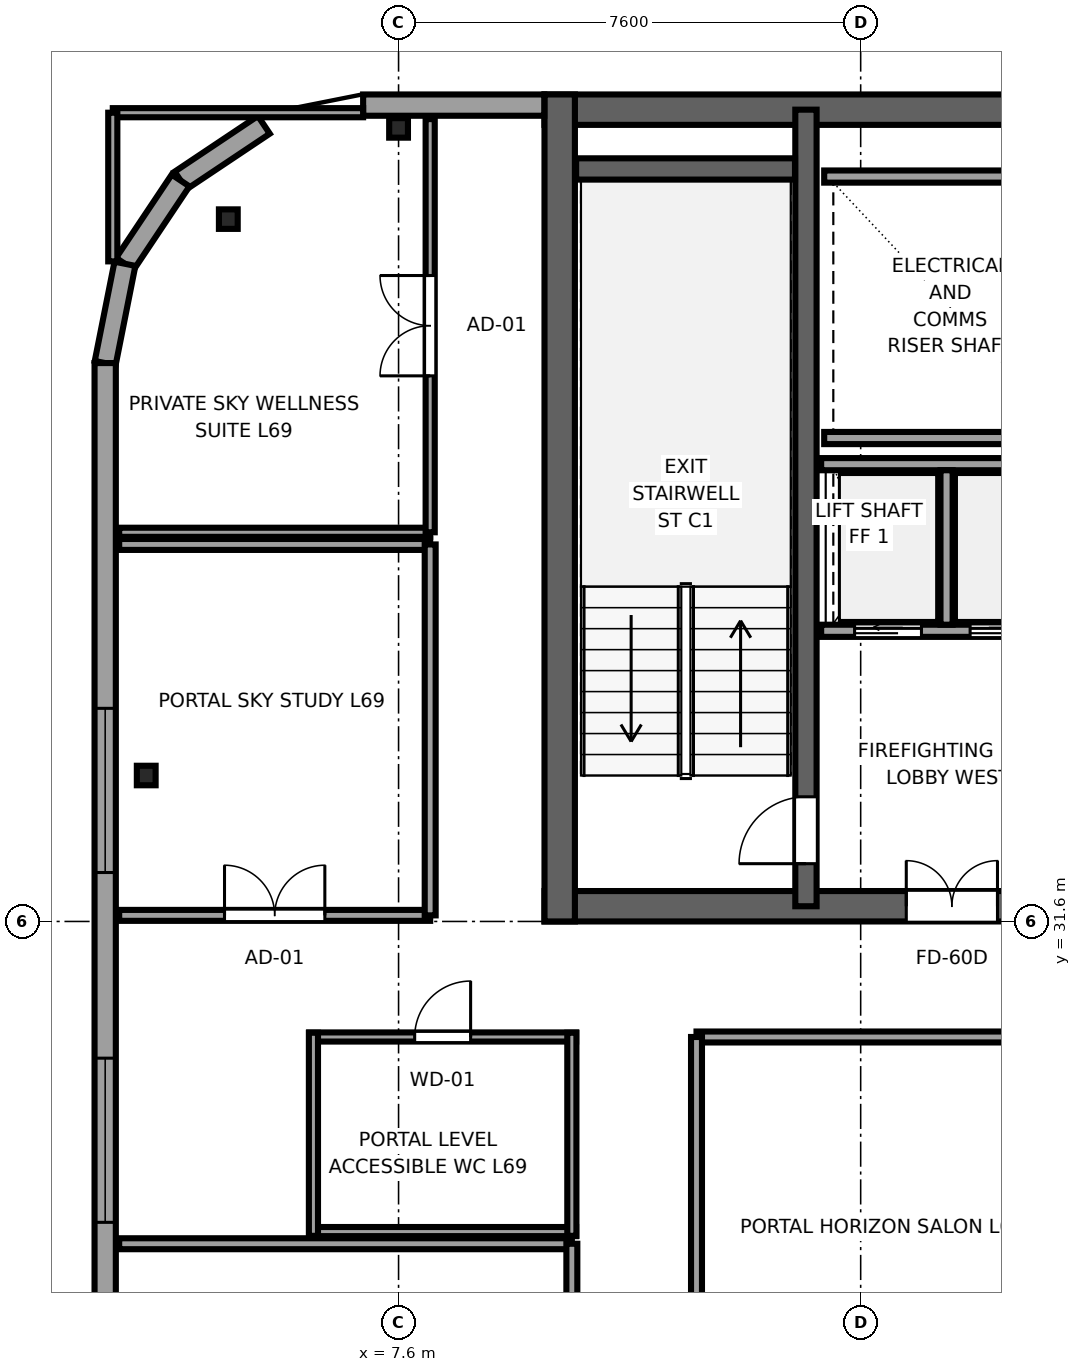
"""IFC4 building model, lengths in metres.
Left out: names, types, materials, properties, quantities, classifications, styles, units other than length and angle.
Written with IfcOpenShell. Run it as: python <this file> out.ifc"""

import sys

from ifc_helpers import new_model, si_unit, direction, frame, frame_2d, origin, origin_2d, place, context, subcontext, project, spatial, rectangle, i_section, extrude, source, transform, mapped, element, fill, save


model = new_model("IFC4")
c1 = context("Model", 3, precision=1e-05, world=origin(), true_north=direction((0.0, 1.0)))
c2 = subcontext(c1, "Body", "Model", "MODEL_VIEW")
j1 = project(units=[si_unit("LENGTHUNIT", "METRE"), si_unit("PLANEANGLEUNIT", "RADIAN")], contexts=[c1])
p1 = place(None, origin())
s1 = spatial("IfcSite", under=j1, at=p1, CompositionType="ELEMENT")
p2 = place(p1, origin())
s2 = spatial("IfcBuilding", under=s1, at=p2, CompositionType="ELEMENT")
p3 = place(p2, frame((0.0, 0.0, 259.4)))
s3 = spatial("IfcBuildingStorey", under=s2, at=p3, CompositionType="ELEMENT", Elevation=259.4)
p4 = place(p3, frame((10.0, 31.85, 0.0), z_axis=(0.0, 0.0, 1.0), x_axis=(1.0, 0.0, 0.0)))
e1 = element("IfcWall", 1, at=p4, inside=s3, PredefinedType="SHEAR", context=c2, shape_type="SweptSolid", body=[
    extrude(rectangle(XDim=26.0, YDim=0.5, at=frame_2d((13.0, 0.0))), origin(), (0.0, 0.0, 1.0), 3.55),
])
p5 = place(p4, frame((7.45, 0.0, 0.0), z_axis=(0.0, 0.0, 1.0), x_axis=(-1.0, 0.0, 0.0)))
e2 = element("IfcOpeningElement", 2, at=p5, cuts=e1, PredefinedType="OPENING", context=c2, shape_type="SweptSolid", body=[
    extrude(rectangle(XDim=1.5, YDim=2.04, at=frame_2d((0.75, 1.02))), frame((0.0, 0.26, 0.0), z_axis=(0.0, -1.0, 0.0), x_axis=(1.0, 0.0, 0.0)), (0.0, 0.0, 1.0), 0.52),
])
p6 = place(p4, frame((13.75, 0.0, 0.0), z_axis=(0.0, 0.0, 1.0), x_axis=(-1.0, 0.0, 0.0)))
e3 = element("IfcOpeningElement", 3, at=p6, cuts=e1, PredefinedType="OPENING", context=c2, shape_type="SweptSolid", body=[
    extrude(rectangle(XDim=1.5, YDim=2.04, at=frame_2d((0.75, 1.02))), frame((0.0, 0.26, 0.0), z_axis=(0.0, -1.0, 0.0), x_axis=(1.0, 0.0, 0.0)), (0.0, 0.0, 1.0), 0.52),
])
p7 = place(p4, frame((20.05, 0.0, 0.0), z_axis=(0.0, 0.0, 1.0), x_axis=(-1.0, 0.0, 0.0)))
e4 = element("IfcOpeningElement", 4, at=p7, cuts=e1, PredefinedType="OPENING", context=c2, shape_type="SweptSolid", body=[
    extrude(rectangle(XDim=1.5, YDim=2.04, at=frame_2d((0.75, 1.02))), frame((0.0, 0.26, 0.0), z_axis=(0.0, -1.0, 0.0), x_axis=(1.0, 0.0, 0.0)), (0.0, 0.0, 1.0), 0.52),
])
p8 = place(p3, frame((10.0, 44.95, 0.0), z_axis=(0.0, 0.0, 1.0), x_axis=(1.0, 0.0, 0.0)))
e5 = element("IfcWall", 5, at=p8, inside=s3, PredefinedType="SHEAR", context=c2, shape_type="SweptSolid", body=[
    extrude(rectangle(XDim=26.0, YDim=0.5, at=frame_2d((13.0, 0.0))), origin(), (0.0, 0.0, 1.0), 3.55),
])
p9 = place(p3, frame((10.25, 31.6, 0.0), z_axis=(0.0, 0.0, 1.0), x_axis=(0.0, 1.0, 0.0)))
e6 = element("IfcWall", 6, at=p9, inside=s3, PredefinedType="SHEAR", context=c2, shape_type="SweptSolid", body=[
    extrude(rectangle(XDim=13.6, YDim=0.5, at=frame_2d((6.8, 0.0))), origin(), (0.0, 0.0, 1.0), 3.55),
])
p10 = place(p3, frame((14.3, 31.85, 0.0), z_axis=(0.0, 0.0, 1.0), x_axis=(0.0, 1.0, 0.0)))
e7 = element("IfcWall", 7, at=p10, inside=s3, PredefinedType="SHEAR", context=c2, shape_type="SweptSolid", body=[
    extrude(rectangle(XDim=13.1, YDim=0.35, at=frame_2d((6.55, 0.0))), origin(), (0.0, 0.0, 1.0), 3.55),
])
p11 = place(p10, frame((0.7, 0.0, 0.0)))
e8 = element("IfcOpeningElement", 8, at=p11, cuts=e7, PredefinedType="OPENING", context=c2, shape_type="SweptSolid", body=[
    extrude(rectangle(XDim=1.1, YDim=2.12, at=frame_2d((0.55, 1.06))), frame((0.0, 0.185, 0.0), z_axis=(0.0, -1.0, 0.0), x_axis=(1.0, 0.0, 0.0)), (0.0, 0.0, 1.0), 0.37),
])
p12 = place(p3, frame((10.52, 43.975, 0.0), z_axis=(0.0, 0.0, 1.0), x_axis=(1.0, 0.0, 0.0)))
e9 = element("IfcWall", 9, at=p12, inside=s3, PredefinedType="SHEAR", context=c2, shape_type="SweptSolid", body=[
    extrude(rectangle(XDim=3.6, YDim=0.35, at=frame_2d((1.8, 0.0))), origin(), (0.0, 0.0, 1.0), 3.55),
])
m1 = source(origin(), c2, "Body", "SweptSolid", [
    extrude(i_section(OverallWidth=0.309, OverallDepth=0.321, WebThickness=0.014, FlangeThickness=0.022, FilletRadius=0.017, at=origin_2d()), origin(), (0.0, 0.0, 1.0), 3.55),
])
for number, where, z_axis, x_axis in (
    (10, (4.8, 43.15, 0.0), (0.0, 0.0, 1.0), (1.0, 0.0, 0.0)),
    (11, (7.6, 44.65, 0.0), (0.0, 0.0, 1.0), (1.0, 0.0, 0.0)),
    (12, (3.45, 34.0, 0.0), (0.0, 0.0, 1.0), (1.0, 0.0, 0.0)),
):
    element("IfcColumn", number, at=place(p3, frame(where, z_axis=z_axis, x_axis=x_axis)), inside=s3, PredefinedType="COLUMN", context=c2, shape_type="MappedRepresentation", body=[
        mapped(m1, transform((0.0, 0.0, 0.0), x_axis=(1.0, 0.0, 0.0), y_axis=(0.0, 1.0, 0.0), z_axis=(0.0, 0.0, 1.0), scale=1.0)),
    ])
p13 = place(p3, frame((9.996, 45.025, 0.0), z_axis=(0.0, 0.0, 1.0), x_axis=(-1.0, 0.0, 0.0)))
e13 = element("IfcWall", 13, at=p13, inside=s3, PredefinedType="SOLIDWALL", context=c2, shape_type="SweptSolid", body=[
    extrude(rectangle(XDim=2.979, YDim=0.35, at=frame_2d((1.49, 0.0))), origin(), (0.0, 0.0, 1.0), 2.16),
])
for number, where, z_axis, x_axis in (
    (14, (5.385, 44.7, 0.0), (0.0, 0.0, 1.0), (-0.832, -0.556, 0.0)),
    (15, (4.015, 43.785, 0.0), (0.0, 0.0, 1.0), (-0.556, -0.831, 0.0)),
):
    element("IfcWall", number, at=place(p3, frame(where, z_axis=z_axis, x_axis=x_axis)), inside=s3, PredefinedType="SOLIDWALL", context=c2, shape_type="SweptSolid", body=[
        extrude(rectangle(XDim=1.647, YDim=0.35, at=frame_2d((0.824, 0.0))), origin(), (0.0, 0.0, 1.0), 2.9),
    ])
p14 = place(p3, frame((3.1, 42.416, 0.0), z_axis=(0.0, 0.0, 1.0), x_axis=(-0.195044345786, -0.980794424524, 0.0)))
e16 = element("IfcWall", 16, at=p14, inside=s3, PredefinedType="SOLIDWALL", context=c2, shape_type="SweptSolid", body=[
    extrude(rectangle(XDim=1.665, YDim=0.35, at=frame_2d((0.833, 0.0))), origin(), (0.0, 0.0, 1.0), 3.37),
])
p15 = place(p3, frame((2.775, 40.783, 0.0), z_axis=(0.0, 0.0, 1.0), x_axis=(0.0, -1.0, 0.0)))
e17 = element("IfcWall", 17, at=p15, inside=s3, PredefinedType="SOLIDWALL", context=c2, shape_type="SweptSolid", body=[
    extrude(rectangle(XDim=33.766, YDim=0.35, at=frame_2d((16.883, 0.0))), origin(), (0.0, 0.0, 1.0), 3.37),
])
p16 = place(p15, frame((5.678, 0.0, 0.68)))
e18 = element("IfcOpeningElement", 18, at=p16, cuts=e17, PredefinedType="OPENING", context=c2, shape_type="SweptSolid", body=[
    extrude(rectangle(XDim=2.7, YDim=1.95, at=frame_2d((1.35, 0.975))), frame((0.0, 0.185, 0.0), z_axis=(0.0, -1.0, 0.0), x_axis=(1.0, 0.0, 0.0)), (0.0, 0.0, 1.0), 0.37),
])
p17 = place(p15, frame((11.431, 0.0, 0.68)))
e19 = element("IfcOpeningElement", 19, at=p17, cuts=e17, PredefinedType="OPENING", context=c2, shape_type="SweptSolid", body=[
    extrude(rectangle(XDim=2.7, YDim=1.95, at=frame_2d((1.35, 0.975))), frame((0.0, 0.185, 0.0), z_axis=(0.0, -1.0, 0.0), x_axis=(1.0, 0.0, 0.0)), (0.0, 0.0, 1.0), 0.37),
])
p18 = place(p15, frame((15.533, 0.0, 0.68)))
e20 = element("IfcOpeningElement", 20, at=p18, cuts=e17, PredefinedType="OPENING", context=c2, shape_type="SweptSolid", body=[
    extrude(rectangle(XDim=2.7, YDim=1.95, at=frame_2d((1.35, 0.975))), frame((0.0, 0.185, 0.0), z_axis=(0.0, -1.0, 0.0), x_axis=(1.0, 0.0, 0.0)), (0.0, 0.0, 1.0), 0.37),
])
p19 = place(p15, frame((20.185, 0.0, 0.68)))
e21 = element("IfcOpeningElement", 21, at=p19, cuts=e17, PredefinedType="OPENING", context=c2, shape_type="SweptSolid", body=[
    extrude(rectangle(XDim=2.7, YDim=1.95, at=frame_2d((1.35, 0.975))), frame((0.0, 0.185, 0.0), z_axis=(0.0, -1.0, 0.0), x_axis=(1.0, 0.0, 0.0)), (0.0, 0.0, 1.0), 0.37),
])
p20 = place(p15, frame((24.837, 0.0, 0.68)))
e22 = element("IfcOpeningElement", 22, at=p20, cuts=e17, PredefinedType="OPENING", context=c2, shape_type="SweptSolid", body=[
    extrude(rectangle(XDim=2.7, YDim=1.95, at=frame_2d((1.35, 0.975))), frame((0.0, 0.185, 0.0), z_axis=(0.0, -1.0, 0.0), x_axis=(1.0, 0.0, 0.0)), (0.0, 0.0, 1.0), 0.37),
])
p21 = place(p15, frame((29.489, 0.0, 0.68)))
e23 = element("IfcOpeningElement", 23, at=p21, cuts=e17, PredefinedType="OPENING", context=c2, shape_type="SweptSolid", body=[
    extrude(rectangle(XDim=2.7, YDim=1.95, at=frame_2d((1.35, 0.975))), frame((0.0, 0.185, 0.0), z_axis=(0.0, -1.0, 0.0), x_axis=(1.0, 0.0, 0.0)), (0.0, 0.0, 1.0), 0.37),
])
for number, where, z_axis, x_axis in (
    (24, (14.6, 39.55, 0.0), (0.0, 0.0, 1.0), (1.0, 0.0, 0.0)),
    (25, (14.6, 43.85, 0.0), (0.0, 0.0, 1.0), (1.0, 0.0, 0.0)),
):
    element("IfcWall", number, at=place(p3, frame(where, z_axis=z_axis, x_axis=x_axis)), inside=s3, PredefinedType="SOLIDWALL", context=c2, shape_type="SweptSolid", body=[
        extrude(rectangle(XDim=4.1, YDim=0.2, at=frame_2d((2.05, 0.0))), origin(), (0.0, 0.0, 1.0), 3.37),
    ])
p22 = place(p3, frame((14.55, 36.38, 0.0), z_axis=(0.0, 0.0, 1.0), x_axis=(1.0, 0.0, 0.0)))
e26 = element("IfcWall", 26, at=p22, inside=s3, PredefinedType="SOLIDWALL", context=c2, shape_type="SweptSolid", body=[
    extrude(rectangle(XDim=4.075, YDim=0.2, at=frame_2d((2.038, 0.0))), origin(), (0.0, 0.0, 1.0), 3.37),
])
p23 = place(p22, frame((0.55, 0.0, 0.0)))
e27 = element("IfcOpeningElement", 27, at=p23, cuts=e26, PredefinedType="OPENING", context=c2, shape_type="SweptSolid", body=[
    extrude(rectangle(XDim=1.1, YDim=2.12, at=frame_2d((0.55, 1.06))), frame((0.0, 0.11, 0.0), z_axis=(0.0, -1.0, 0.0), x_axis=(1.0, 0.0, 0.0)), (0.0, 0.0, 1.0), 0.22),
])
p24 = place(p22, frame((2.45, 0.0, 0.0)))
e28 = element("IfcOpeningElement", 28, at=p24, cuts=e26, PredefinedType="OPENING", context=c2, shape_type="SweptSolid", body=[
    extrude(rectangle(XDim=1.1, YDim=2.12, at=frame_2d((0.55, 1.06))), frame((0.0, 0.11, 0.0), z_axis=(0.0, -1.0, 0.0), x_axis=(1.0, 0.0, 0.0)), (0.0, 0.0, 1.0), 0.22),
])
p25 = place(p3, frame((14.55, 39.12, 0.0), z_axis=(0.0, 0.0, 1.0), x_axis=(1.0, 0.0, 0.0)))
e29 = element("IfcWall", 29, at=p25, inside=s3, PredefinedType="SOLIDWALL", context=c2, shape_type="SweptSolid", body=[
    extrude(rectangle(XDim=4.075, YDim=0.2, at=frame_2d((2.038, 0.0))), origin(), (0.0, 0.0, 1.0), 3.37),
])
p26 = place(p3, frame((16.613, 36.48, 0.0), z_axis=(0.0, 0.0, 1.0), x_axis=(0.0, 1.0, 0.0)))
e30 = element("IfcWall", 30, at=p26, inside=s3, PredefinedType="SOLIDWALL", context=c2, shape_type="SweptSolid", body=[
    extrude(rectangle(XDim=2.54, YDim=0.2, at=frame_2d((1.27, 0.0))), origin(), (0.0, 0.0, 1.0), 3.37),
])
p27 = place(p3, frame((12.5, 29.7, 0.0), z_axis=(0.0, 0.0, 1.0), x_axis=(1.0, 0.0, 0.0)))
e31 = element("IfcWall", 31, at=p27, inside=s3, PredefinedType="PARTITIONING", context=c2, shape_type="SweptSolid", body=[
    extrude(rectangle(XDim=6.1, YDim=0.18, at=frame_2d((3.05, 0.0))), origin(), (0.0, 0.0, 1.0), 3.37),
])
p28 = place(p3, frame((12.5, 22.5, 0.0), z_axis=(0.0, 0.0, 1.0), x_axis=(0.0, 1.0, 0.0)))
e32 = element("IfcWall", 32, at=p28, inside=s3, PredefinedType="PARTITIONING", context=c2, shape_type="SweptSolid", body=[
    extrude(rectangle(XDim=7.2, YDim=0.18, at=frame_2d((3.6, 0.0))), origin(), (0.0, 0.0, 1.0), 3.37),
])
p29 = place(p3, frame((3.005, 26.3, 0.0), z_axis=(0.0, 0.0, 1.0), x_axis=(1.0, 0.0, 0.0)))
e33 = element("IfcWall", 33, at=p29, inside=s3, PredefinedType="PARTITIONING", context=c2, shape_type="SweptSolid", body=[
    extrude(rectangle(XDim=7.445, YDim=0.18, at=frame_2d((3.723, 0.0))), origin(), (0.0, 0.0, 1.0), 3.37),
])
p30 = place(p3, frame((10.45, 22.0, 0.0), z_axis=(0.0, 0.0, 1.0), x_axis=(0.0, 1.0, 0.0)))
e34 = element("IfcWall", 34, at=p30, inside=s3, PredefinedType="PARTITIONING", context=c2, shape_type="SweptSolid", body=[
    extrude(rectangle(XDim=4.3, YDim=0.18, at=frame_2d((2.15, 0.0))), origin(), (0.0, 0.0, 1.0), 3.37),
])
p31 = place(p30, frame((1.325, 0.0, 0.0)))
e35 = element("IfcOpeningElement", 35, at=p31, cuts=e34, PredefinedType="OPENING", context=c2, shape_type="SweptSolid", body=[
    extrude(rectangle(XDim=1.65, YDim=2.15, at=frame_2d((0.825, 1.075))), frame((0.0, 0.1, 0.0), z_axis=(0.0, -1.0, 0.0), x_axis=(1.0, 0.0, 0.0)), (0.0, 0.0, 1.0), 0.2),
])
p32 = place(p3, frame((6.13, 26.5, 0.0), z_axis=(0.0, 0.0, 1.0), x_axis=(1.0, 0.0, 0.0)))
e36 = element("IfcWall", 36, at=p32, inside=s3, PredefinedType="PARTITIONING", context=c2, shape_type="SweptSolid", body=[
    extrude(rectangle(XDim=4.39, YDim=0.15, at=frame_2d((2.195, 0.0))), origin(), (0.0, 0.0, 1.0), 3.37),
])
p33 = place(p3, frame((6.13, 29.7, 0.0), z_axis=(0.0, 0.0, 1.0), x_axis=(1.0, 0.0, 0.0)))
e37 = element("IfcWall", 37, at=p33, inside=s3, PredefinedType="PARTITIONING", context=c2, shape_type="SweptSolid", body=[
    extrude(rectangle(XDim=4.39, YDim=0.15, at=frame_2d((2.195, 0.0))), origin(), (0.0, 0.0, 1.0), 3.37),
])
p34 = place(p33, frame((1.735, 0.0, 0.0)))
e38 = element("IfcOpeningElement", 38, at=p34, cuts=e37, PredefinedType="OPENING", context=c2, shape_type="SweptSolid", body=[
    extrude(rectangle(XDim=0.92, YDim=2.01, at=frame_2d((0.46, 1.005))), frame((0.0, 0.085, 0.0), z_axis=(0.0, -1.0, 0.0), x_axis=(1.0, 0.0, 0.0)), (0.0, 0.0, 1.0), 0.17),
])
for number, where, z_axis, x_axis in (
    (39, (6.2, 26.43, 0.0), (0.0, 0.0, 1.0), (0.0, 1.0, 0.0)),
    (40, (10.45, 26.43, 0.0), (0.0, 0.0, 1.0), (0.0, 1.0, 0.0)),
):
    element("IfcWall", number, at=place(p3, frame(where, z_axis=z_axis, x_axis=x_axis)), inside=s3, PredefinedType="PARTITIONING", context=c2, shape_type="SweptSolid", body=[
        extrude(rectangle(XDim=3.34, YDim=0.15, at=frame_2d((1.67, 0.0))), origin(), (0.0, 0.0, 1.0), 3.37),
    ])
p35 = place(p3, frame((3.005, 31.7, 0.0), z_axis=(0.0, 0.0, 1.0), x_axis=(1.0, 0.0, 0.0)))
e41 = element("IfcWall", 41, at=p35, inside=s3, PredefinedType="PARTITIONING", context=c2, shape_type="SweptSolid", body=[
    extrude(rectangle(XDim=5.115, YDim=0.18, at=frame_2d((2.558, 0.0))), origin(), (0.0, 0.0, 1.0), 3.37),
])
p36 = place(p35, frame((1.732, 0.0, 0.0)))
e42 = element("IfcOpeningElement", 42, at=p36, cuts=e41, PredefinedType="OPENING", context=c2, shape_type="SweptSolid", body=[
    extrude(rectangle(XDim=1.65, YDim=2.15, at=frame_2d((0.825, 1.075))), frame((0.0, 0.1, 0.0), z_axis=(0.0, -1.0, 0.0), x_axis=(1.0, 0.0, 0.0)), (0.0, 0.0, 1.0), 0.2),
])
p37 = place(p3, frame((3.005, 37.8, 0.0), z_axis=(0.0, 0.0, 1.0), x_axis=(1.0, 0.0, 0.0)))
e43 = element("IfcWall", 43, at=p37, inside=s3, PredefinedType="PARTITIONING", context=c2, shape_type="SweptSolid", body=[
    extrude(rectangle(XDim=5.115, YDim=0.18, at=frame_2d((2.558, 0.0))), origin(), (0.0, 0.0, 1.0), 3.37),
])
p38 = place(p3, frame((8.12, 31.7, 0.0), z_axis=(0.0, 0.0, 1.0), x_axis=(0.0, 1.0, 0.0)))
e44 = element("IfcWall", 44, at=p38, inside=s3, PredefinedType="PARTITIONING", context=c2, shape_type="SweptSolid", body=[
    extrude(rectangle(XDim=6.1, YDim=0.18, at=frame_2d((3.05, 0.0))), origin(), (0.0, 0.0, 1.0), 3.37),
])
p39 = place(p3, frame((3.005, 38.0, 0.0), z_axis=(0.0, 0.0, 1.0), x_axis=(1.0, 0.0, 0.0)))
e45 = element("IfcWall", 45, at=p39, inside=s3, PredefinedType="PARTITIONING", context=c2, shape_type="SweptSolid", body=[
    extrude(rectangle(XDim=5.115, YDim=0.15, at=frame_2d((2.558, 0.0))), origin(), (0.0, 0.0, 1.0), 3.37),
])
p40 = place(p3, frame((2.9, 44.9, 0.0), z_axis=(0.0, 0.0, 1.0), x_axis=(1.0, 0.0, 0.0)))
e46 = element("IfcWall", 46, at=p40, inside=s3, PredefinedType="PARTITIONING", context=c2, shape_type="SweptSolid", body=[
    extrude(rectangle(XDim=4.117, YDim=0.15, at=frame_2d((2.059, 0.0))), origin(), (0.0, 0.0, 1.0), 3.37),
])
p41 = place(p3, frame((2.9, 42.455, 0.0), z_axis=(0.0, 0.0, 1.0), x_axis=(0.0, 1.0, 0.0)))
e47 = element("IfcWall", 47, at=p41, inside=s3, PredefinedType="PARTITIONING", context=c2, shape_type="SweptSolid", body=[
    extrude(rectangle(XDim=2.445, YDim=0.15, at=frame_2d((1.222, 0.0))), origin(), (0.0, 0.0, 1.0), 3.37),
])
p42 = place(p3, frame((8.12, 38.0, 0.0), z_axis=(0.0, 0.0, 1.0), x_axis=(0.0, 1.0, 0.0)))
e48 = element("IfcWall", 48, at=p42, inside=s3, PredefinedType="PARTITIONING", context=c2, shape_type="SweptSolid", body=[
    extrude(rectangle(XDim=6.795, YDim=0.15, at=frame_2d((3.397, 0.0))), origin(), (0.0, 0.0, 1.0), 3.37),
])
p43 = place(p42, frame((2.573, 0.0, 0.0)))
e49 = element("IfcOpeningElement", 49, at=p43, cuts=e48, PredefinedType="OPENING", context=c2, shape_type="SweptSolid", body=[
    extrude(rectangle(XDim=1.65, YDim=2.15, at=frame_2d((0.825, 1.075))), frame((0.0, 0.085, 0.0), z_axis=(0.0, -1.0, 0.0), x_axis=(1.0, 0.0, 0.0)), (0.0, 0.0, 1.0), 0.17),
])
m2 = source(origin(), c2, "Body", "SweptSolid", [
    extrude(rectangle(XDim=2.7, YDim=1.95, at=frame_2d((1.35, 0.975))), frame((0.0, 0.09, 0.0), z_axis=(0.0, -1.0, 0.0), x_axis=(1.0, 0.0, 0.0)), (0.0, 0.0, 1.0), 0.06),
])
p44 = place(p16, origin())
e50 = element("IfcWindow", 50, at=p44, inside=s3, PartitioningType="TRIPLE_PANEL_HORIZONTAL", PredefinedType="WINDOW", context=c2, shape_type="MappedRepresentation", body=[
    mapped(m2, transform((0.0, 0.0, 0.0), x_axis=(1.0, 0.0, 0.0), y_axis=(0.0, 1.0, 0.0), z_axis=(0.0, 0.0, 1.0), scale=1.0)),
])
fill(e18, e50)
p45 = place(p17, origin())
e51 = element("IfcWindow", 51, at=p45, inside=s3, PartitioningType="TRIPLE_PANEL_HORIZONTAL", PredefinedType="WINDOW", context=c2, shape_type="MappedRepresentation", body=[
    mapped(m2, transform((0.0, 0.0, 0.0), x_axis=(1.0, 0.0, 0.0), y_axis=(0.0, 1.0, 0.0), z_axis=(0.0, 0.0, 1.0), scale=1.0)),
])
fill(e19, e51)
m3 = source(origin(), c2, "Body", "SweptSolid", [
    extrude(rectangle(XDim=1.1, YDim=2.12, at=frame_2d((0.55, 1.06))), frame((0.0, 0.025, 0.0), z_axis=(0.0, -1.0, 0.0), x_axis=(1.0, 0.0, 0.0)), (0.0, 0.0, 1.0), 0.05),
])
p46 = place(p11, origin())
e52 = element("IfcDoor", 52, at=p46, inside=s3, OperationType="SINGLE_SWING_LEFT", PredefinedType="DOOR", context=c2, shape_type="MappedRepresentation", body=[
    mapped(m3, transform((0.0, 0.0, 0.0), x_axis=(1.0, 0.0, 0.0), y_axis=(0.0, 1.0, 0.0), z_axis=(0.0, 0.0, 1.0), scale=1.0)),
])
fill(e8, e52)
m4 = source(origin(), c2, "Body", "SweptSolid", [
    extrude(rectangle(XDim=1.5, YDim=2.04, at=frame_2d((0.75, 1.02))), frame((0.0, 0.025, 0.0), z_axis=(0.0, -1.0, 0.0), x_axis=(1.0, 0.0, 0.0)), (0.0, 0.0, 1.0), 0.05),
])
p47 = place(p5, origin())
e53 = element("IfcDoor", 53, at=p47, inside=s3, OperationType="DOUBLE_DOOR_SINGLE_SWING", PredefinedType="DOOR", context=c2, shape_type="MappedRepresentation", body=[
    mapped(m4, transform((0.0, 0.0, 0.0), x_axis=(1.0, 0.0, 0.0), y_axis=(0.0, 1.0, 0.0), z_axis=(0.0, 0.0, 1.0), scale=1.0)),
])
fill(e2, e53)
m5 = source(origin(), c2, "Body", "SweptSolid", [
    extrude(rectangle(XDim=1.1, YDim=2.12, at=frame_2d((0.55, 1.06))), frame((0.0, 0.025, 0.0), z_axis=(0.0, -1.0, 0.0), x_axis=(1.0, 0.0, 0.0)), (0.0, 0.0, 1.0), 0.05),
])
p48 = place(p23, origin())
e54 = element("IfcDoor", 54, at=p48, inside=s3, OperationType="SLIDING_TO_LEFT", PredefinedType="DOOR", context=c2, shape_type="MappedRepresentation", body=[
    mapped(m5, transform((0.0, 0.0, 0.0), x_axis=(1.0, 0.0, 0.0), y_axis=(0.0, 1.0, 0.0), z_axis=(0.0, 0.0, 1.0), scale=1.0)),
])
fill(e27, e54)
p49 = place(p24, origin())
e55 = element("IfcDoor", 55, at=p49, inside=s3, OperationType="SLIDING_TO_RIGHT", PredefinedType="DOOR", context=c2, shape_type="MappedRepresentation", body=[
    mapped(m5, transform((0.0, 0.0, 0.0), x_axis=(1.0, 0.0, 0.0), y_axis=(0.0, 1.0, 0.0), z_axis=(0.0, 0.0, 1.0), scale=1.0)),
])
fill(e28, e55)
m6 = source(origin(), c2, "Body", "SweptSolid", [
    extrude(rectangle(XDim=0.92, YDim=2.01, at=frame_2d((0.46, 1.005))), frame((0.0, 0.025, 0.0), z_axis=(0.0, -1.0, 0.0), x_axis=(1.0, 0.0, 0.0)), (0.0, 0.0, 1.0), 0.05),
])
p50 = place(p34, origin())
e56 = element("IfcDoor", 56, at=p50, inside=s3, OperationType="SINGLE_SWING_RIGHT", PredefinedType="DOOR", context=c2, shape_type="MappedRepresentation", body=[
    mapped(m6, transform((0.0, 0.0, 0.0), x_axis=(1.0, 0.0, 0.0), y_axis=(0.0, 1.0, 0.0), z_axis=(0.0, 0.0, 1.0), scale=1.0)),
])
fill(e38, e56)
m7 = source(origin(), c2, "Body", "SweptSolid", [
    extrude(rectangle(XDim=1.65, YDim=2.15, at=frame_2d((0.825, 1.075))), frame((0.0, 0.025, 0.0), z_axis=(0.0, -1.0, 0.0), x_axis=(1.0, 0.0, 0.0)), (0.0, 0.0, 1.0), 0.05),
])
p51 = place(p36, origin())
e57 = element("IfcDoor", 57, at=p51, inside=s3, OperationType="DOUBLE_DOOR_SINGLE_SWING", PredefinedType="DOOR", context=c2, shape_type="MappedRepresentation", body=[
    mapped(m7, transform((0.0, 0.0, 0.0), x_axis=(1.0, 0.0, 0.0), y_axis=(0.0, 1.0, 0.0), z_axis=(0.0, 0.0, 1.0), scale=1.0)),
])
fill(e42, e57)
p52 = place(p43, origin())
e58 = element("IfcDoor", 58, at=p52, inside=s3, OperationType="DOUBLE_DOOR_SINGLE_SWING", PredefinedType="DOOR", context=c2, shape_type="MappedRepresentation", body=[
    mapped(m7, transform((0.0, 0.0, 0.0), x_axis=(1.0, 0.0, 0.0), y_axis=(0.0, 1.0, 0.0), z_axis=(0.0, 0.0, 1.0), scale=1.0)),
])
fill(e49, e58)
save(model, sys.argv[1])
